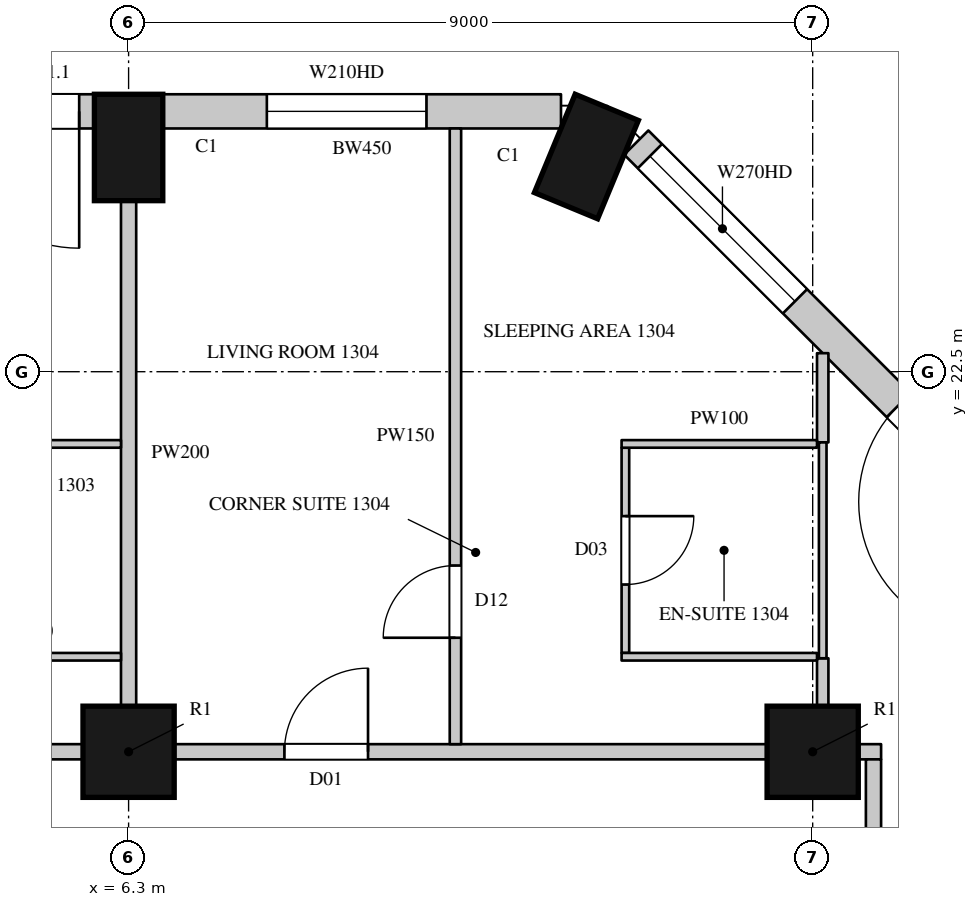
"""IFC4 building model, lengths in metres.
Left out: names, types, materials, properties, quantities, classifications, styles, units other than length and angle.
Written with IfcOpenShell. Run it as: python <this file> out.ifc"""

import sys

from ifc_helpers import new_model, si_unit, direction, frame, frame_2d, origin, origin_2d, place, context, subcontext, project, spatial, rectangle, circle, extrude, element, fill, save


model = new_model("IFC4")
c1 = context("Model", 3, precision=1e-05, world=origin(), true_north=direction((0.0, 1.0)))
c2 = subcontext(c1, "Body", "Model", "MODEL_VIEW")
j1 = project(units=[si_unit("LENGTHUNIT", "METRE"), si_unit("PLANEANGLEUNIT", "RADIAN")], contexts=[c1])
p1 = place(None, origin())
s1 = spatial("IfcSite", under=j1, at=p1, CompositionType="ELEMENT")
p2 = place(p1, origin())
s2 = spatial("IfcBuilding", under=s1, at=p2, CompositionType="ELEMENT")
p3 = place(p2, frame((0.0, 0.0, 77.1)))
s3 = spatial("IfcBuildingStorey", under=s2, at=p3, CompositionType="ELEMENT", Elevation=77.1)
for number, where, z_axis, x_axis in (
    (1, (12.323, 25.331, 0.0), (0.0, 0.0, 1.0), (-0.924, 0.383, 0.0)),
    (2, (6.3, 25.45, 0.0), (0.0, 0.0, 1.0), (-1.0, 0.0, 0.0)),
):
    element("IfcColumn", number, at=place(p3, frame(where, z_axis=z_axis, x_axis=x_axis)), inside=s3, PredefinedType="COLUMN", context=c2, shape_type="SweptSolid", body=[
        extrude(rectangle(XDim=0.9, YDim=1.4, at=origin_2d()), origin(), (0.0, 0.0, 1.0), 3.6),
    ])
for number, where, z_axis, x_axis in (
    (3, (6.3, 17.5, 0.0), (0.0, 0.0, 1.0), (1.0, 0.0, 0.0)),
    (4, (15.3, 17.5, 0.0), (0.0, 0.0, 1.0), (1.0, 0.0, 0.0)),
):
    element("IfcColumn", number, at=place(p3, frame(where, z_axis=z_axis, x_axis=x_axis)), inside=s3, PredefinedType="COLUMN", context=c2, shape_type="SweptSolid", body=[
        extrude(circle(Radius=0.6, at=origin_2d()), origin(), (0.0, 0.0, 1.0), 3.6),
    ])
p4 = place(p3, frame((18.229, 20.265, 0.0), z_axis=(0.0, 0.0, 1.0), x_axis=(-0.707106781187, 0.707106781187, 0.0)))
e5 = element("IfcWall", 5, at=p4, inside=s3, PredefinedType="SOLIDWALL", context=c2, shape_type="SweptSolid", body=[
    extrude(rectangle(XDim=7.424, YDim=0.45, at=frame_2d((3.712, 0.0))), origin(), (0.0, 0.0, 1.0), 3.3),
])
p5 = place(p4, frame((0.74, 0.0, 0.0)))
e6 = element("IfcOpeningElement", 6, at=p5, cuts=e5, PredefinedType="OPENING", context=c2, shape_type="SweptSolid", body=[
    extrude(rectangle(XDim=1.8, YDim=2.4, at=frame_2d((0.9, 1.2))), frame((0.0, 0.235, 0.0), z_axis=(0.0, -1.0, 0.0), x_axis=(1.0, 0.0, 0.0)), (0.0, 0.0, 1.0), 0.47),
])
p6 = place(p4, frame((4.471, 0.0, 1.05)))
e7 = element("IfcOpeningElement", 7, at=p6, cuts=e5, PredefinedType="OPENING", context=c2, shape_type="SweptSolid", body=[
    extrude(rectangle(XDim=2.7, YDim=2.0, at=frame_2d((1.35, 1.0))), frame((0.0, 0.235, 0.0), z_axis=(0.0, -1.0, 0.0), x_axis=(1.0, 0.0, 0.0)), (0.0, 0.0, 1.0), 0.47),
])
p7 = place(p3, frame((11.989, 25.925, 0.0), z_axis=(0.0, 0.0, 1.0), x_axis=(-1.0, 0.0, 0.0)))
e8 = element("IfcWall", 8, at=p7, inside=s3, PredefinedType="SOLIDWALL", context=c2, shape_type="SweptSolid", body=[
    extrude(rectangle(XDim=5.239, YDim=0.45, at=frame_2d((2.619, 0.0))), origin(), (0.0, 0.0, 1.0), 3.3),
])
p8 = place(p7, frame((1.77, 0.0, 1.05)))
e9 = element("IfcOpeningElement", 9, at=p8, cuts=e8, PredefinedType="OPENING", context=c2, shape_type="SweptSolid", body=[
    extrude(rectangle(XDim=2.1, YDim=2.0, at=frame_2d((1.05, 1.0))), frame((0.0, 0.235, 0.0), z_axis=(0.0, -1.0, 0.0), x_axis=(1.0, 0.0, 0.0)), (0.0, 0.0, 1.0), 0.47),
])
p9 = place(p3, frame((5.85, 25.925, 0.0), z_axis=(0.0, 0.0, 1.0), x_axis=(-1.0, 0.0, 0.0)))
e10 = element("IfcWall", 10, at=p9, inside=s3, PredefinedType="SOLIDWALL", context=c2, shape_type="SweptSolid", body=[
    extrude(rectangle(XDim=8.1, YDim=0.45, at=frame_2d((4.05, 0.0))), origin(), (0.0, 0.0, 1.0), 3.3),
])
p10 = place(p9, frame((0.2, 0.0, 0.0)))
e11 = element("IfcOpeningElement", 11, at=p10, cuts=e10, PredefinedType="OPENING", context=c2, shape_type="SweptSolid", body=[
    extrude(rectangle(XDim=1.8, YDim=2.4, at=frame_2d((0.9, 1.2))), frame((0.0, 0.235, 0.0), z_axis=(0.0, -1.0, 0.0), x_axis=(1.0, 0.0, 0.0)), (0.0, 0.0, 1.0), 0.47),
])
p11 = place(p9, frame((2.2, 0.0, 1.05)))
e12 = element("IfcOpeningElement", 12, at=p11, cuts=e10, PredefinedType="OPENING", context=c2, shape_type="SweptSolid", body=[
    extrude(rectangle(XDim=1.2, YDim=2.0, at=frame_2d((0.6, 1.0))), frame((0.0, 0.235, 0.0), z_axis=(0.0, -1.0, 0.0), x_axis=(1.0, 0.0, 0.0)), (0.0, 0.0, 1.0), 0.47),
])
p12 = place(p9, frame((4.7, 0.0, 0.0)))
e13 = element("IfcOpeningElement", 13, at=p12, cuts=e10, PredefinedType="OPENING", context=c2, shape_type="SweptSolid", body=[
    extrude(rectangle(XDim=1.8, YDim=2.4, at=frame_2d((0.9, 1.2))), frame((0.0, 0.235, 0.0), z_axis=(0.0, -1.0, 0.0), x_axis=(1.0, 0.0, 0.0)), (0.0, 0.0, 1.0), 0.47),
])
p13 = place(p9, frame((6.7, 0.0, 1.05)))
e14 = element("IfcOpeningElement", 14, at=p13, cuts=e10, PredefinedType="OPENING", context=c2, shape_type="SweptSolid", body=[
    extrude(rectangle(XDim=1.2, YDim=2.0, at=frame_2d((0.6, 1.0))), frame((0.0, 0.235, 0.0), z_axis=(0.0, -1.0, 0.0), x_axis=(1.0, 0.0, 0.0)), (0.0, 0.0, 1.0), 0.47),
])
p14 = place(p3, frame((16.486, 23.529, 0.0), z_axis=(0.0, 0.0, 1.0), x_axis=(-0.707022305137, 0.707191247145, 0.0)))
e15 = element("IfcWall", 15, at=p14, inside=s3, PredefinedType="SOLIDWALL", context=c2, shape_type="SweptSolid", body=[
    extrude(rectangle(XDim=1.445, YDim=0.45, at=frame_2d((0.723, 0.0))), origin(), (0.0, 0.0, 1.0), 0.6),
])
p15 = place(p3, frame((-2.1, 17.5, 0.0), z_axis=(0.0, 0.0, 1.0), x_axis=(1.0, 0.0, 0.0)))
e16 = element("IfcWall", 16, at=p15, inside=s3, PredefinedType="PARTITIONING", context=c2, shape_type="SweptSolid", body=[
    extrude(rectangle(XDim=7.8, YDim=0.2, at=frame_2d((3.9, 0.0))), origin(), (0.0, 0.0, 1.0), 2.75),
])
p16 = place(p15, frame((1.55, 0.0, 0.0)))
e17 = element("IfcOpeningElement", 17, at=p16, cuts=e16, PredefinedType="OPENING", context=c2, shape_type="SweptSolid", body=[
    extrude(rectangle(XDim=1.1, YDim=2.4, at=frame_2d((0.55, 1.2))), frame((0.0, 0.11, 0.0), z_axis=(0.0, -1.0, 0.0), x_axis=(1.0, 0.0, 0.0)), (0.0, 0.0, 1.0), 0.22),
])
p17 = place(p3, frame((6.9, 17.5, 0.0), z_axis=(0.0, 0.0, 1.0), x_axis=(1.0, 0.0, 0.0)))
e18 = element("IfcWall", 18, at=p17, inside=s3, PredefinedType="PARTITIONING", context=c2, shape_type="SweptSolid", body=[
    extrude(rectangle(XDim=7.8, YDim=0.2, at=frame_2d((3.9, 0.0))), origin(), (0.0, 0.0, 1.0), 2.75),
])
p18 = place(p17, frame((1.45, 0.0, 0.0)))
e19 = element("IfcOpeningElement", 19, at=p18, cuts=e18, PredefinedType="OPENING", context=c2, shape_type="SweptSolid", body=[
    extrude(rectangle(XDim=1.1, YDim=2.4, at=frame_2d((0.55, 1.2))), frame((0.0, 0.11, 0.0), z_axis=(0.0, -1.0, 0.0), x_axis=(1.0, 0.0, 0.0)), (0.0, 0.0, 1.0), 0.22),
])
p19 = place(p3, frame((15.9, 17.5, 0.0), z_axis=(0.0, 0.0, 1.0), x_axis=(1.0, 0.0, 0.0)))
e20 = element("IfcWall", 20, at=p19, inside=s3, PredefinedType="PARTITIONING", context=c2, shape_type="SweptSolid", body=[
    extrude(rectangle(XDim=0.3, YDim=0.2, at=frame_2d((0.15, 0.0))), origin(), (0.0, 0.0, 1.0), 3.3),
])
p20 = place(p3, frame((16.1, 4.75, 0.0), z_axis=(0.0, 0.0, 1.0), x_axis=(0.0, 1.0, 0.0)))
e21 = element("IfcWall", 21, at=p20, inside=s3, PredefinedType="PARTITIONING", context=c2, shape_type="SweptSolid", body=[
    extrude(rectangle(XDim=12.65, YDim=0.2, at=frame_2d((6.325, 0.0))), origin(), (0.0, 0.0, 1.0), 3.3),
])
p21 = place(p20, frame((0.5, 0.0, 0.0)))
e22 = element("IfcOpeningElement", 22, at=p21, cuts=e21, PredefinedType="OPENING", context=c2, shape_type="SweptSolid", body=[
    extrude(rectangle(XDim=0.95, YDim=2.2, at=frame_2d((0.475, 1.1))), frame((0.0, 0.11, 0.0), z_axis=(0.0, -1.0, 0.0), x_axis=(1.0, 0.0, 0.0)), (0.0, 0.0, 1.0), 0.22),
])
p22 = place(p20, frame((6.9, 0.0, 0.0)))
e23 = element("IfcOpeningElement", 23, at=p22, cuts=e21, PredefinedType="OPENING", context=c2, shape_type="SweptSolid", body=[
    extrude(rectangle(XDim=0.95, YDim=2.2, at=frame_2d((0.475, 1.1))), frame((0.0, 0.11, 0.0), z_axis=(0.0, -1.0, 0.0), x_axis=(1.0, 0.0, 0.0)), (0.0, 0.0, 1.0), 0.22),
])
p23 = place(p3, frame((10.6, 17.6, 0.0), z_axis=(0.0, 0.0, 1.0), x_axis=(0.0, 1.0, 0.0)))
e24 = element("IfcWall", 24, at=p23, inside=s3, PredefinedType="PARTITIONING", context=c2, shape_type="SweptSolid", body=[
    extrude(rectangle(XDim=8.1, YDim=0.15, at=frame_2d((4.05, 0.0))), origin(), (0.0, 0.0, 1.0), 3.3),
])
p24 = place(p23, frame((1.4, 0.0, 0.0)))
e25 = element("IfcOpeningElement", 25, at=p24, cuts=e24, PredefinedType="OPENING", context=c2, shape_type="SweptSolid", body=[
    extrude(rectangle(XDim=0.95, YDim=2.2, at=frame_2d((0.475, 1.1))), frame((0.0, 0.085, 0.0), z_axis=(0.0, -1.0, 0.0), x_axis=(1.0, 0.0, 0.0)), (0.0, 0.0, 1.0), 0.17),
])
p25 = place(p3, frame((15.432, 18.094, 0.0), z_axis=(0.0, 0.0, 1.0), x_axis=(0.0, 1.0, 0.0)))
e26 = element("IfcWall", 26, at=p25, inside=s3, PredefinedType="PARTITIONING", context=c2, shape_type="SweptSolid", body=[
    extrude(rectangle(XDim=0.636, YDim=0.15, at=frame_2d((0.318, 0.0))), origin(), (0.0, 0.0, 1.0), 3.3),
])
p26 = place(p3, frame((15.432, 21.57, 0.0), z_axis=(0.0, 0.0, 1.0), x_axis=(0.0, 1.0, 0.0)))
e27 = element("IfcWall", 27, at=p26, inside=s3, PredefinedType="PARTITIONING", context=c2, shape_type="SweptSolid", body=[
    extrude(rectangle(XDim=1.174, YDim=0.15, at=frame_2d((0.587, 0.0))), origin(), (0.0, 0.0, 1.0), 3.3),
])
p27 = place(p3, frame((6.3, 18.1, 0.0), z_axis=(0.0, 0.0, 1.0), x_axis=(0.0, 1.0, 0.0)))
e28 = element("IfcWall", 28, at=p27, inside=s3, PredefinedType="PARTITIONING", context=c2, shape_type="SweptSolid", body=[
    extrude(rectangle(XDim=6.65, YDim=0.2, at=frame_2d((3.325, 0.0))), origin(), (0.0, 0.0, 1.0), 2.75),
])
for number, where, z_axis, x_axis in (
    (29, (3.654, 18.75, 0.0), (0.0, 0.0, 1.0), (1.0, 0.0, 0.0)),
    (30, (3.654, 21.55, 0.0), (0.0, 0.0, 1.0), (1.0, 0.0, 0.0)),
):
    element("IfcWall", number, at=place(p3, frame(where, z_axis=z_axis, x_axis=x_axis)), inside=s3, PredefinedType="PARTITIONING", context=c2, shape_type="SweptSolid", body=[
        extrude(rectangle(XDim=2.546, YDim=0.1, at=frame_2d((1.273, 0.0))), origin(), (0.0, 0.0, 1.0), 3.3),
    ])
p28 = place(p3, frame((12.836, 18.8, 0.0), z_axis=(0.0, 0.0, 1.0), x_axis=(0.0, 1.0, 0.0)))
e31 = element("IfcWall", 31, at=p28, inside=s3, PredefinedType="PARTITIONING", context=c2, shape_type="SweptSolid", body=[
    extrude(rectangle(XDim=2.7, YDim=0.1, at=frame_2d((1.35, 0.0))), origin(), (0.0, 0.0, 1.0), 3.3),
])
p29 = place(p28, frame((0.9, 0.0, 0.0)))
e32 = element("IfcOpeningElement", 32, at=p29, cuts=e31, PredefinedType="OPENING", context=c2, shape_type="SweptSolid", body=[
    extrude(rectangle(XDim=0.9, YDim=2.2, at=frame_2d((0.45, 1.1))), frame((0.0, 0.06, 0.0), z_axis=(0.0, -1.0, 0.0), x_axis=(1.0, 0.0, 0.0)), (0.0, 0.0, 1.0), 0.12),
])
for number, where, z_axis, x_axis in (
    (33, (12.786, 18.75, 0.0), (0.0, 0.0, 1.0), (1.0, 0.0, 0.0)),
    (34, (12.786, 21.55, 0.0), (0.0, 0.0, 1.0), (1.0, 0.0, 0.0)),
):
    element("IfcWall", number, at=place(p3, frame(where, z_axis=z_axis, x_axis=x_axis)), inside=s3, PredefinedType="PARTITIONING", context=c2, shape_type="SweptSolid", body=[
        extrude(rectangle(XDim=2.571, YDim=0.1, at=frame_2d((1.286, 0.0))), origin(), (0.0, 0.0, 1.0), 3.3),
    ])
p30 = place(p3, frame((15.432, 18.73, 0.0), z_axis=(0.0, 0.0, 1.0), x_axis=(0.0, 1.0, 0.0)))
e35 = element("IfcWall", 35, at=p30, inside=s3, PredefinedType="PARTITIONING", context=c2, shape_type="SweptSolid", body=[
    extrude(rectangle(XDim=2.84, YDim=0.1, at=frame_2d((1.42, 0.0))), origin(), (0.0, 0.0, 1.0), 3.3),
])
p31 = place(p5, origin())
e36 = element("IfcDoor", 36, at=p31, inside=s3, OperationType="SLIDING_TO_LEFT", PredefinedType="DOOR", context=c2, shape_type="SweptSolid", body=[
    extrude(rectangle(XDim=1.8, YDim=2.4, at=frame_2d((0.9, 1.2))), frame((0.0, 0.13, 0.0), z_axis=(0.0, -1.0, 0.0), x_axis=(1.0, 0.0, 0.0)), (0.0, 0.0, 1.0), 0.05),
])
fill(e6, e36)
p32 = place(p6, origin())
e37 = element("IfcWindow", 37, at=p32, inside=s3, PartitioningType="SINGLE_PANEL", PredefinedType="WINDOW", context=c2, shape_type="SweptSolid", body=[
    extrude(rectangle(XDim=2.7, YDim=2.0, at=frame_2d((1.35, 1.0))), frame((0.0, 0.135, 0.0), z_axis=(0.0, -1.0, 0.0), x_axis=(1.0, 0.0, 0.0)), (0.0, 0.0, 1.0), 0.06),
])
fill(e7, e37)
p33 = place(p10, origin())
e38 = element("IfcDoor", 38, at=p33, inside=s3, OperationType="SLIDING_TO_LEFT", PredefinedType="DOOR", context=c2, shape_type="SweptSolid", body=[
    extrude(rectangle(XDim=1.8, YDim=2.4, at=frame_2d((0.9, 1.2))), frame((0.0, 0.13, 0.0), z_axis=(0.0, -1.0, 0.0), x_axis=(1.0, 0.0, 0.0)), (0.0, 0.0, 1.0), 0.05),
])
fill(e11, e38)
p34 = place(p18, origin())
e39 = element("IfcDoor", 39, at=p34, inside=s3, OperationType="SINGLE_SWING_RIGHT", PredefinedType="DOOR", context=c2, shape_type="SweptSolid", body=[
    extrude(rectangle(XDim=1.1, YDim=2.4, at=frame_2d((0.55, 1.2))), frame((0.0, 0.025, 0.0), z_axis=(0.0, -1.0, 0.0), x_axis=(1.0, 0.0, 0.0)), (0.0, 0.0, 1.0), 0.05),
])
fill(e19, e39)
p35 = place(p24, origin())
e40 = element("IfcDoor", 40, at=p35, inside=s3, OperationType="SINGLE_SWING_LEFT", PredefinedType="DOOR", context=c2, shape_type="SweptSolid", body=[
    extrude(rectangle(XDim=0.95, YDim=2.2, at=frame_2d((0.475, 1.1))), frame((0.0, 0.025, 0.0), z_axis=(0.0, -1.0, 0.0), x_axis=(1.0, 0.0, 0.0)), (0.0, 0.0, 1.0), 0.05),
])
fill(e25, e40)
p36 = place(p29, origin())
e41 = element("IfcDoor", 41, at=p36, inside=s3, OperationType="SINGLE_SWING_LEFT", PredefinedType="DOOR", context=c2, shape_type="SweptSolid", body=[
    extrude(rectangle(XDim=0.9, YDim=2.2, at=frame_2d((0.45, 1.1))), frame((0.0, 0.025, 0.0), z_axis=(0.0, -1.0, 0.0), x_axis=(1.0, 0.0, 0.0)), (0.0, 0.0, 1.0), 0.05),
])
fill(e32, e41)
p37 = place(p8, origin())
e42 = element("IfcWindow", 42, at=p37, inside=s3, PartitioningType="SINGLE_PANEL", PredefinedType="WINDOW", context=c2, shape_type="SweptSolid", body=[
    extrude(rectangle(XDim=2.1, YDim=2.0, at=frame_2d((1.05, 1.0))), frame((0.0, 0.135, 0.0), z_axis=(0.0, -1.0, 0.0), x_axis=(1.0, 0.0, 0.0)), (0.0, 0.0, 1.0), 0.06),
])
fill(e9, e42)
save(model, sys.argv[1])
